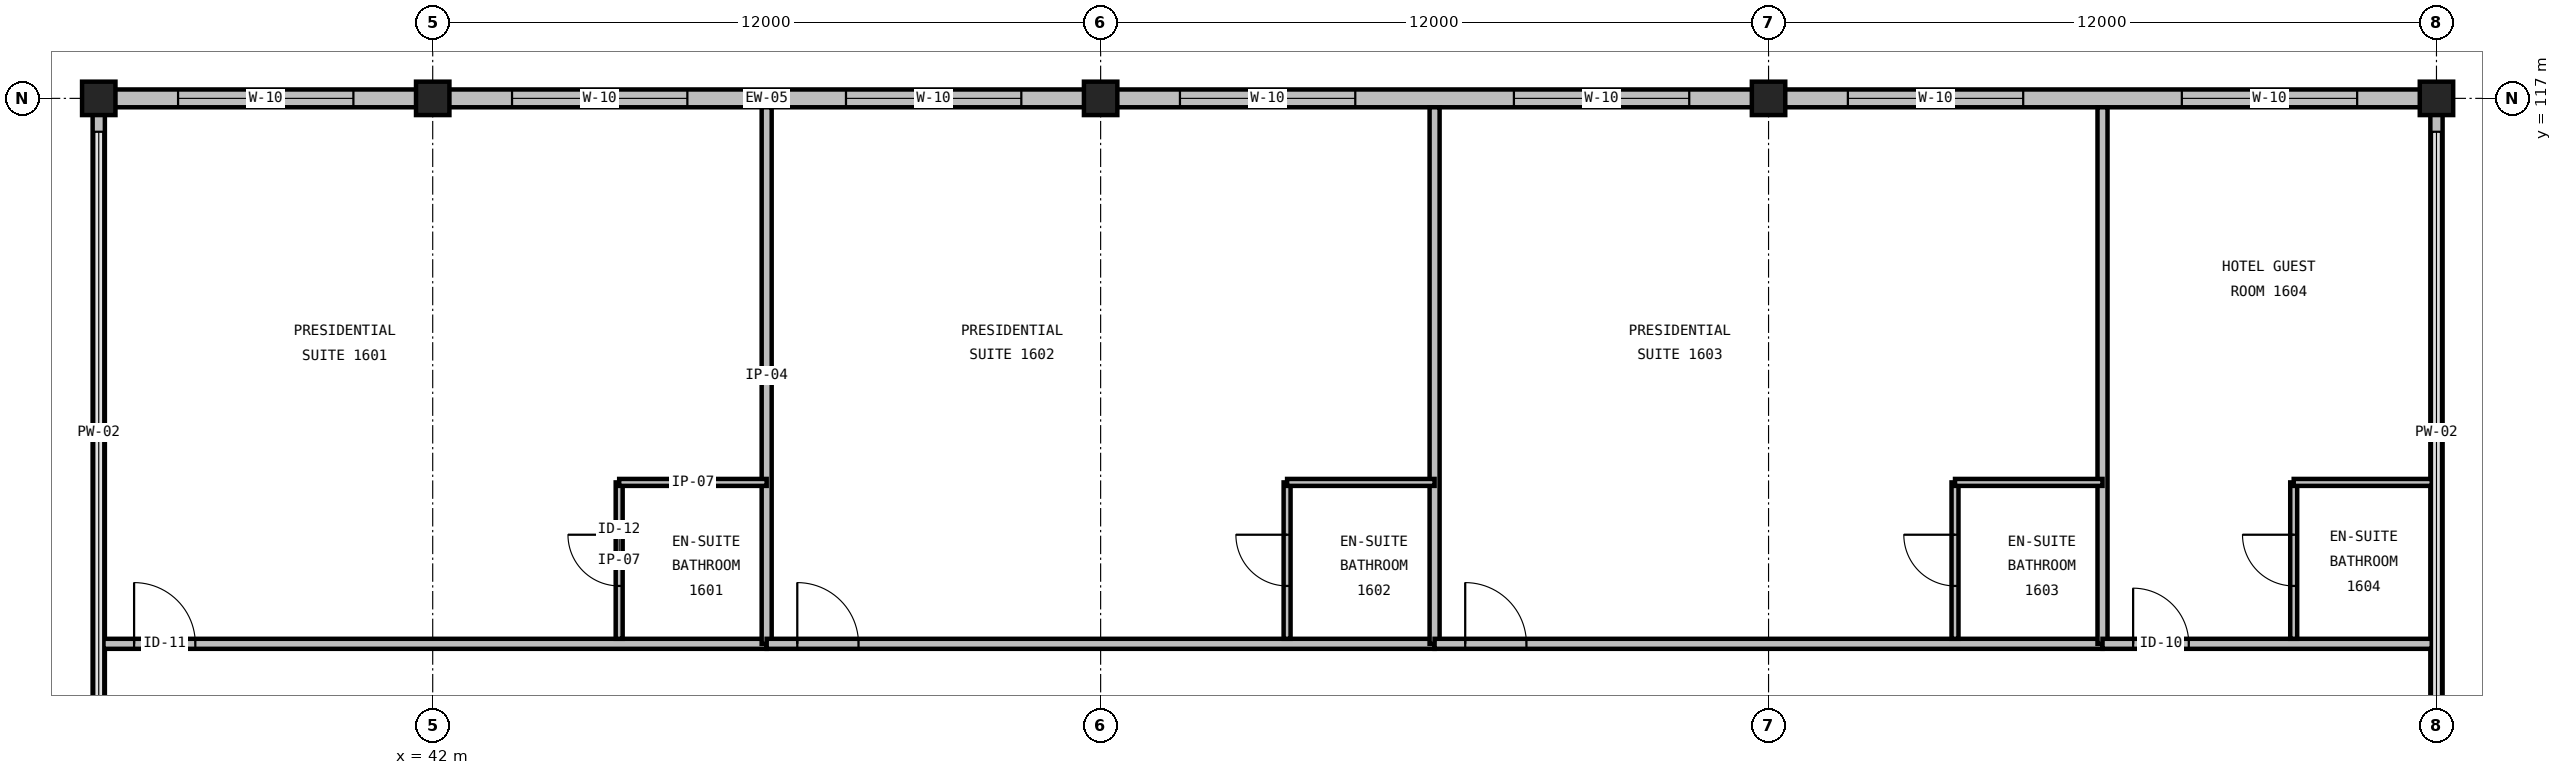
"""IFC4 building model, lengths in metres.
Left out: names, types, materials, properties, quantities, classifications, styles, units other than length and angle.
Written with IfcOpenShell. Run it as: python <this file> out.ifc"""

import sys

from ifc_helpers import new_model, si_unit, direction, frame, frame_2d, origin, origin_2d, place, context, subcontext, project, spatial, rectangle, extrude, element, fill, save


model = new_model("IFC4")
c1 = context("Model", 3, precision=1e-05, world=origin(), true_north=direction((0.0, 1.0)))
c2 = subcontext(c1, "Body", "Model", "MODEL_VIEW")
j1 = project(units=[si_unit("LENGTHUNIT", "METRE"), si_unit("PLANEANGLEUNIT", "RADIAN")], contexts=[c1])
p1 = place(None, origin())
s1 = spatial("IfcSite", under=j1, at=p1, CompositionType="ELEMENT")
p2 = place(p1, origin())
s2 = spatial("IfcBuilding", under=s1, at=p2, CompositionType="ELEMENT")
p3 = place(p2, frame((0.0, 0.0, 67.2)))
s3 = spatial("IfcBuildingStorey", under=s2, at=p3, CompositionType="ELEMENT", Elevation=67.2)
for number, where, z_axis, x_axis in (
    (1, (36.0, 117.0, 0.0), (0.0, 0.0, 1.0), (1.0, 0.0, 0.0)),
    (2, (42.0, 117.0, 0.0), (0.0, 0.0, 1.0), (1.0, 0.0, 0.0)),
    (3, (54.0, 117.0, 0.0), (0.0, 0.0, 1.0), (1.0, 0.0, 0.0)),
    (4, (66.0, 117.0, 0.0), (0.0, 0.0, 1.0), (1.0, 0.0, 0.0)),
    (5, (78.0, 117.0, 0.0), (0.0, 0.0, 1.0), (1.0, 0.0, 0.0)),
):
    element("IfcColumn", number, at=place(p3, frame(where, z_axis=z_axis, x_axis=x_axis)), inside=s3, PredefinedType="COLUMN", context=c2, shape_type="SweptSolid", body=[
        extrude(rectangle(XDim=0.6, YDim=0.6, at=origin_2d()), origin(), (0.0, 0.0, 1.0), 3.6),
    ])
p4 = place(p3, frame((42.0, 117.0, 0.0), z_axis=(0.0, 0.0, 1.0), x_axis=(-1.0, 0.0, 0.0)))
e6 = element("IfcWall", 6, at=p4, inside=s3, PredefinedType="STANDARD", context=c2, shape_type="SweptSolid", body=[
    extrude(rectangle(XDim=6.0, YDim=0.32, at=frame_2d((3.0, 0.0))), origin(), (0.0, 0.0, 1.0), 2.526),
])
p5 = place(p4, frame((1.425, 0.0, 0.65)))
e7 = element("IfcOpeningElement", 7, at=p5, cuts=e6, PredefinedType="OPENING", context=c2, shape_type="SweptSolid", body=[
    extrude(rectangle(XDim=3.15, YDim=1.75, at=frame_2d((1.575, 0.875))), frame((0.0, 0.175, 0.0), z_axis=(0.0, -1.0, 0.0), x_axis=(1.0, 0.0, 0.0)), (0.0, 0.0, 1.0), 0.35),
])
p6 = place(p3, frame((54.0, 117.0, 0.0), z_axis=(0.0, 0.0, 1.0), x_axis=(-1.0, 0.0, 0.0)))
e8 = element("IfcWall", 8, at=p6, inside=s3, PredefinedType="STANDARD", context=c2, shape_type="SweptSolid", body=[
    extrude(rectangle(XDim=12.0, YDim=0.32, at=frame_2d((6.0, 0.0))), origin(), (0.0, 0.0, 1.0), 2.526),
])
p7 = place(p6, frame((1.425, 0.0, 0.65)))
e9 = element("IfcOpeningElement", 9, at=p7, cuts=e8, PredefinedType="OPENING", context=c2, shape_type="SweptSolid", body=[
    extrude(rectangle(XDim=3.15, YDim=1.75, at=frame_2d((1.575, 0.875))), frame((0.0, 0.175, 0.0), z_axis=(0.0, -1.0, 0.0), x_axis=(1.0, 0.0, 0.0)), (0.0, 0.0, 1.0), 0.35),
])
p8 = place(p6, frame((7.425, 0.0, 0.65)))
e10 = element("IfcOpeningElement", 10, at=p8, cuts=e8, PredefinedType="OPENING", context=c2, shape_type="SweptSolid", body=[
    extrude(rectangle(XDim=3.15, YDim=1.75, at=frame_2d((1.575, 0.875))), frame((0.0, 0.175, 0.0), z_axis=(0.0, -1.0, 0.0), x_axis=(1.0, 0.0, 0.0)), (0.0, 0.0, 1.0), 0.35),
])
p9 = place(p3, frame((66.0, 117.0, 0.0), z_axis=(0.0, 0.0, 1.0), x_axis=(-1.0, 0.0, 0.0)))
e11 = element("IfcWall", 11, at=p9, inside=s3, PredefinedType="STANDARD", context=c2, shape_type="SweptSolid", body=[
    extrude(rectangle(XDim=12.0, YDim=0.32, at=frame_2d((6.0, 0.0))), origin(), (0.0, 0.0, 1.0), 2.526),
])
p10 = place(p9, frame((1.425, 0.0, 0.65)))
e12 = element("IfcOpeningElement", 12, at=p10, cuts=e11, PredefinedType="OPENING", context=c2, shape_type="SweptSolid", body=[
    extrude(rectangle(XDim=3.15, YDim=1.75, at=frame_2d((1.575, 0.875))), frame((0.0, 0.175, 0.0), z_axis=(0.0, -1.0, 0.0), x_axis=(1.0, 0.0, 0.0)), (0.0, 0.0, 1.0), 0.35),
])
p11 = place(p9, frame((7.425, 0.0, 0.65)))
e13 = element("IfcOpeningElement", 13, at=p11, cuts=e11, PredefinedType="OPENING", context=c2, shape_type="SweptSolid", body=[
    extrude(rectangle(XDim=3.15, YDim=1.75, at=frame_2d((1.575, 0.875))), frame((0.0, 0.175, 0.0), z_axis=(0.0, -1.0, 0.0), x_axis=(1.0, 0.0, 0.0)), (0.0, 0.0, 1.0), 0.35),
])
p12 = place(p3, frame((78.0, 117.0, 0.0), z_axis=(0.0, 0.0, 1.0), x_axis=(-1.0, 0.0, 0.0)))
e14 = element("IfcWall", 14, at=p12, inside=s3, PredefinedType="STANDARD", context=c2, shape_type="SweptSolid", body=[
    extrude(rectangle(XDim=12.0, YDim=0.32, at=frame_2d((6.0, 0.0))), origin(), (0.0, 0.0, 1.0), 2.526),
])
p13 = place(p12, frame((1.425, 0.0, 0.65)))
e15 = element("IfcOpeningElement", 15, at=p13, cuts=e14, PredefinedType="OPENING", context=c2, shape_type="SweptSolid", body=[
    extrude(rectangle(XDim=3.15, YDim=1.75, at=frame_2d((1.575, 0.875))), frame((0.0, 0.175, 0.0), z_axis=(0.0, -1.0, 0.0), x_axis=(1.0, 0.0, 0.0)), (0.0, 0.0, 1.0), 0.35),
])
p14 = place(p12, frame((7.425, 0.0, 0.65)))
e16 = element("IfcOpeningElement", 16, at=p14, cuts=e14, PredefinedType="OPENING", context=c2, shape_type="SweptSolid", body=[
    extrude(rectangle(XDim=3.15, YDim=1.75, at=frame_2d((1.575, 0.875))), frame((0.0, 0.175, 0.0), z_axis=(0.0, -1.0, 0.0), x_axis=(1.0, 0.0, 0.0)), (0.0, 0.0, 1.0), 0.35),
])
for number, where, z_axis, x_axis in (
    (17, (36.0, 117.0, 0.0), (0.0, 0.0, 1.0), (0.0, -1.0, 0.0)),
    (18, (78.0, 105.0, 0.0), (0.0, 0.0, 1.0), (0.0, 1.0, 0.0)),
):
    element("IfcWall", number, at=place(p3, frame(where, z_axis=z_axis, x_axis=x_axis)), inside=s3, PredefinedType="PARAPET", context=c2, shape_type="SweptSolid", body=[
        extrude(rectangle(XDim=12.0, YDim=0.22, at=frame_2d((6.0, 0.0))), origin(), (0.0, 0.0, 1.0), 0.2),
    ])
p15 = place(p3, frame((36.085, 107.2, 0.0), z_axis=(0.0, 0.0, 1.0), x_axis=(1.0, 0.0, 0.0)))
e19 = element("IfcWall", 19, at=p15, inside=s3, PredefinedType="PARTITIONING", context=c2, shape_type="SweptSolid", body=[
    extrude(rectangle(XDim=11.915, YDim=0.18, at=frame_2d((5.957, 0.0))), origin(), (0.0, 0.0, 1.0), 3.28),
])
p16 = place(p15, frame((0.55, 0.0, 0.0)))
e20 = element("IfcOpeningElement", 20, at=p16, cuts=e19, PredefinedType="OPENING", context=c2, shape_type="SweptSolid", body=[
    extrude(rectangle(XDim=1.1, YDim=2.2, at=frame_2d((0.55, 1.1))), frame((0.0, 0.105, 0.0), z_axis=(0.0, -1.0, 0.0), x_axis=(1.0, 0.0, 0.0)), (0.0, 0.0, 1.0), 0.21),
])
p17 = place(p3, frame((48.0, 107.2, 0.0), z_axis=(0.0, 0.0, 1.0), x_axis=(0.0, 1.0, 0.0)))
e21 = element("IfcWall", 21, at=p17, inside=s3, PredefinedType="PARTITIONING", context=c2, shape_type="SweptSolid", body=[
    extrude(rectangle(XDim=9.64, YDim=0.18, at=frame_2d((4.82, 0.0))), origin(), (0.0, 0.0, 1.0), 3.28),
])
p18 = place(p3, frame((45.35, 107.29, 0.0), z_axis=(0.0, 0.0, 1.0), x_axis=(0.0, 1.0, 0.0)))
e22 = element("IfcWall", 22, at=p18, inside=s3, PredefinedType="PARTITIONING", context=c2, shape_type="SweptSolid", body=[
    extrude(rectangle(XDim=2.81, YDim=0.125, at=frame_2d((1.405, 0.0))), origin(), (0.0, 0.0, 1.0), 3.28),
])
p19 = place(p18, frame((0.95, 0.0, 0.0)))
e23 = element("IfcOpeningElement", 23, at=p19, cuts=e22, PredefinedType="OPENING", context=c2, shape_type="SweptSolid", body=[
    extrude(rectangle(XDim=0.92, YDim=2.1, at=frame_2d((0.46, 1.05))), frame((0.0, 0.077, 0.0), z_axis=(0.0, -1.0, 0.0), x_axis=(1.0, 0.0, 0.0)), (0.0, 0.0, 1.0), 0.155),
])
p20 = place(p3, frame((45.35, 110.1, 0.0), z_axis=(0.0, 0.0, 1.0), x_axis=(1.0, 0.0, 0.0)))
e24 = element("IfcWall", 24, at=p20, inside=s3, PredefinedType="PARTITIONING", context=c2, shape_type="SweptSolid", body=[
    extrude(rectangle(XDim=2.65, YDim=0.125, at=frame_2d((1.325, 0.0))), origin(), (0.0, 0.0, 1.0), 3.28),
])
p21 = place(p3, frame((48.0, 107.2, 0.0), z_axis=(0.0, 0.0, 1.0), x_axis=(1.0, 0.0, 0.0)))
e25 = element("IfcWall", 25, at=p21, inside=s3, PredefinedType="PARTITIONING", context=c2, shape_type="SweptSolid", body=[
    extrude(rectangle(XDim=12.0, YDim=0.18, at=frame_2d((6.0, 0.0))), origin(), (0.0, 0.0, 1.0), 3.28),
])
p22 = place(p21, frame((0.55, 0.0, 0.0)))
e26 = element("IfcOpeningElement", 26, at=p22, cuts=e25, PredefinedType="OPENING", context=c2, shape_type="SweptSolid", body=[
    extrude(rectangle(XDim=1.1, YDim=2.2, at=frame_2d((0.55, 1.1))), frame((0.0, 0.105, 0.0), z_axis=(0.0, -1.0, 0.0), x_axis=(1.0, 0.0, 0.0)), (0.0, 0.0, 1.0), 0.21),
])
p23 = place(p3, frame((60.0, 107.2, 0.0), z_axis=(0.0, 0.0, 1.0), x_axis=(0.0, 1.0, 0.0)))
e27 = element("IfcWall", 27, at=p23, inside=s3, PredefinedType="PARTITIONING", context=c2, shape_type="SweptSolid", body=[
    extrude(rectangle(XDim=9.64, YDim=0.18, at=frame_2d((4.82, 0.0))), origin(), (0.0, 0.0, 1.0), 3.28),
])
p24 = place(p3, frame((57.35, 107.29, 0.0), z_axis=(0.0, 0.0, 1.0), x_axis=(0.0, 1.0, 0.0)))
e28 = element("IfcWall", 28, at=p24, inside=s3, PredefinedType="PARTITIONING", context=c2, shape_type="SweptSolid", body=[
    extrude(rectangle(XDim=2.81, YDim=0.125, at=frame_2d((1.405, 0.0))), origin(), (0.0, 0.0, 1.0), 3.28),
])
p25 = place(p24, frame((0.95, 0.0, 0.0)))
e29 = element("IfcOpeningElement", 29, at=p25, cuts=e28, PredefinedType="OPENING", context=c2, shape_type="SweptSolid", body=[
    extrude(rectangle(XDim=0.92, YDim=2.1, at=frame_2d((0.46, 1.05))), frame((0.0, 0.077, 0.0), z_axis=(0.0, -1.0, 0.0), x_axis=(1.0, 0.0, 0.0)), (0.0, 0.0, 1.0), 0.155),
])
p26 = place(p3, frame((57.35, 110.1, 0.0), z_axis=(0.0, 0.0, 1.0), x_axis=(1.0, 0.0, 0.0)))
e30 = element("IfcWall", 30, at=p26, inside=s3, PredefinedType="PARTITIONING", context=c2, shape_type="SweptSolid", body=[
    extrude(rectangle(XDim=2.65, YDim=0.125, at=frame_2d((1.325, 0.0))), origin(), (0.0, 0.0, 1.0), 3.28),
])
p27 = place(p3, frame((60.0, 107.2, 0.0), z_axis=(0.0, 0.0, 1.0), x_axis=(1.0, 0.0, 0.0)))
e31 = element("IfcWall", 31, at=p27, inside=s3, PredefinedType="PARTITIONING", context=c2, shape_type="SweptSolid", body=[
    extrude(rectangle(XDim=12.0, YDim=0.18, at=frame_2d((6.0, 0.0))), origin(), (0.0, 0.0, 1.0), 3.28),
])
p28 = place(p27, frame((0.55, 0.0, 0.0)))
e32 = element("IfcOpeningElement", 32, at=p28, cuts=e31, PredefinedType="OPENING", context=c2, shape_type="SweptSolid", body=[
    extrude(rectangle(XDim=1.1, YDim=2.2, at=frame_2d((0.55, 1.1))), frame((0.0, 0.105, 0.0), z_axis=(0.0, -1.0, 0.0), x_axis=(1.0, 0.0, 0.0)), (0.0, 0.0, 1.0), 0.21),
])
p29 = place(p3, frame((72.0, 107.2, 0.0), z_axis=(0.0, 0.0, 1.0), x_axis=(0.0, 1.0, 0.0)))
e33 = element("IfcWall", 33, at=p29, inside=s3, PredefinedType="PARTITIONING", context=c2, shape_type="SweptSolid", body=[
    extrude(rectangle(XDim=9.64, YDim=0.18, at=frame_2d((4.82, 0.0))), origin(), (0.0, 0.0, 1.0), 3.28),
])
p30 = place(p3, frame((69.35, 107.29, 0.0), z_axis=(0.0, 0.0, 1.0), x_axis=(0.0, 1.0, 0.0)))
e34 = element("IfcWall", 34, at=p30, inside=s3, PredefinedType="PARTITIONING", context=c2, shape_type="SweptSolid", body=[
    extrude(rectangle(XDim=2.81, YDim=0.125, at=frame_2d((1.405, 0.0))), origin(), (0.0, 0.0, 1.0), 3.28),
])
p31 = place(p30, frame((0.95, 0.0, 0.0)))
e35 = element("IfcOpeningElement", 35, at=p31, cuts=e34, PredefinedType="OPENING", context=c2, shape_type="SweptSolid", body=[
    extrude(rectangle(XDim=0.92, YDim=2.1, at=frame_2d((0.46, 1.05))), frame((0.0, 0.077, 0.0), z_axis=(0.0, -1.0, 0.0), x_axis=(1.0, 0.0, 0.0)), (0.0, 0.0, 1.0), 0.155),
])
p32 = place(p3, frame((69.35, 110.1, 0.0), z_axis=(0.0, 0.0, 1.0), x_axis=(1.0, 0.0, 0.0)))
e36 = element("IfcWall", 36, at=p32, inside=s3, PredefinedType="PARTITIONING", context=c2, shape_type="SweptSolid", body=[
    extrude(rectangle(XDim=2.65, YDim=0.125, at=frame_2d((1.325, 0.0))), origin(), (0.0, 0.0, 1.0), 3.28),
])
p33 = place(p3, frame((72.0, 107.2, 0.0), z_axis=(0.0, 0.0, 1.0), x_axis=(1.0, 0.0, 0.0)))
e37 = element("IfcWall", 37, at=p33, inside=s3, PredefinedType="PARTITIONING", context=c2, shape_type="SweptSolid", body=[
    extrude(rectangle(XDim=5.915, YDim=0.18, at=frame_2d((2.957, 0.0))), origin(), (0.0, 0.0, 1.0), 3.28),
])
p34 = place(p33, frame((0.55, 0.0, 0.0)))
e38 = element("IfcOpeningElement", 38, at=p34, cuts=e37, PredefinedType="OPENING", context=c2, shape_type="SweptSolid", body=[
    extrude(rectangle(XDim=1.0, YDim=2.15, at=frame_2d((0.5, 1.075))), frame((0.0, 0.105, 0.0), z_axis=(0.0, -1.0, 0.0), x_axis=(1.0, 0.0, 0.0)), (0.0, 0.0, 1.0), 0.21),
])
p35 = place(p3, frame((75.435, 107.29, 0.0), z_axis=(0.0, 0.0, 1.0), x_axis=(0.0, 1.0, 0.0)))
e39 = element("IfcWall", 39, at=p35, inside=s3, PredefinedType="PARTITIONING", context=c2, shape_type="SweptSolid", body=[
    extrude(rectangle(XDim=2.81, YDim=0.125, at=frame_2d((1.405, 0.0))), origin(), (0.0, 0.0, 1.0), 3.28),
])
p36 = place(p35, frame((0.95, 0.0, 0.0)))
e40 = element("IfcOpeningElement", 40, at=p36, cuts=e39, PredefinedType="OPENING", context=c2, shape_type="SweptSolid", body=[
    extrude(rectangle(XDim=0.92, YDim=2.1, at=frame_2d((0.46, 1.05))), frame((0.0, 0.077, 0.0), z_axis=(0.0, -1.0, 0.0), x_axis=(1.0, 0.0, 0.0)), (0.0, 0.0, 1.0), 0.155),
])
p37 = place(p3, frame((75.435, 110.1, 0.0), z_axis=(0.0, 0.0, 1.0), x_axis=(1.0, 0.0, 0.0)))
e41 = element("IfcWall", 41, at=p37, inside=s3, PredefinedType="PARTITIONING", context=c2, shape_type="SweptSolid", body=[
    extrude(rectangle(XDim=2.48, YDim=0.125, at=frame_2d((1.24, 0.0))), origin(), (0.0, 0.0, 1.0), 3.28),
])
p38 = place(p5, origin())
e42 = element("IfcWindow", 42, at=p38, inside=s3, PartitioningType="TRIPLE_PANEL_VERTICAL", PredefinedType="WINDOW", context=c2, shape_type="SweptSolid", body=[
    extrude(rectangle(XDim=3.15, YDim=1.75, at=frame_2d((1.575, 0.875))), frame((0.0, 0.03, 0.0), z_axis=(0.0, -1.0, 0.0), x_axis=(1.0, 0.0, 0.0)), (0.0, 0.0, 1.0), 0.06),
])
fill(e7, e42)
p39 = place(p7, origin())
e43 = element("IfcWindow", 43, at=p39, inside=s3, PartitioningType="TRIPLE_PANEL_VERTICAL", PredefinedType="WINDOW", context=c2, shape_type="SweptSolid", body=[
    extrude(rectangle(XDim=3.15, YDim=1.75, at=frame_2d((1.575, 0.875))), frame((0.0, 0.03, 0.0), z_axis=(0.0, -1.0, 0.0), x_axis=(1.0, 0.0, 0.0)), (0.0, 0.0, 1.0), 0.06),
])
fill(e9, e43)
p40 = place(p8, origin())
e44 = element("IfcWindow", 44, at=p40, inside=s3, PartitioningType="TRIPLE_PANEL_VERTICAL", PredefinedType="WINDOW", context=c2, shape_type="SweptSolid", body=[
    extrude(rectangle(XDim=3.15, YDim=1.75, at=frame_2d((1.575, 0.875))), frame((0.0, 0.03, 0.0), z_axis=(0.0, -1.0, 0.0), x_axis=(1.0, 0.0, 0.0)), (0.0, 0.0, 1.0), 0.06),
])
fill(e10, e44)
p41 = place(p10, origin())
e45 = element("IfcWindow", 45, at=p41, inside=s3, PartitioningType="TRIPLE_PANEL_VERTICAL", PredefinedType="WINDOW", context=c2, shape_type="SweptSolid", body=[
    extrude(rectangle(XDim=3.15, YDim=1.75, at=frame_2d((1.575, 0.875))), frame((0.0, 0.03, 0.0), z_axis=(0.0, -1.0, 0.0), x_axis=(1.0, 0.0, 0.0)), (0.0, 0.0, 1.0), 0.06),
])
fill(e12, e45)
p42 = place(p11, origin())
e46 = element("IfcWindow", 46, at=p42, inside=s3, PartitioningType="TRIPLE_PANEL_VERTICAL", PredefinedType="WINDOW", context=c2, shape_type="SweptSolid", body=[
    extrude(rectangle(XDim=3.15, YDim=1.75, at=frame_2d((1.575, 0.875))), frame((0.0, 0.03, 0.0), z_axis=(0.0, -1.0, 0.0), x_axis=(1.0, 0.0, 0.0)), (0.0, 0.0, 1.0), 0.06),
])
fill(e13, e46)
p43 = place(p13, origin())
e47 = element("IfcWindow", 47, at=p43, inside=s3, PartitioningType="TRIPLE_PANEL_VERTICAL", PredefinedType="WINDOW", context=c2, shape_type="SweptSolid", body=[
    extrude(rectangle(XDim=3.15, YDim=1.75, at=frame_2d((1.575, 0.875))), frame((0.0, 0.03, 0.0), z_axis=(0.0, -1.0, 0.0), x_axis=(1.0, 0.0, 0.0)), (0.0, 0.0, 1.0), 0.06),
])
fill(e15, e47)
p44 = place(p14, origin())
e48 = element("IfcWindow", 48, at=p44, inside=s3, PartitioningType="TRIPLE_PANEL_VERTICAL", PredefinedType="WINDOW", context=c2, shape_type="SweptSolid", body=[
    extrude(rectangle(XDim=3.15, YDim=1.75, at=frame_2d((1.575, 0.875))), frame((0.0, 0.03, 0.0), z_axis=(0.0, -1.0, 0.0), x_axis=(1.0, 0.0, 0.0)), (0.0, 0.0, 1.0), 0.06),
])
fill(e16, e48)
p45 = place(p16, origin())
e49 = element("IfcDoor", 49, at=p45, inside=s3, OperationType="SINGLE_SWING_LEFT", PredefinedType="DOOR", context=c2, shape_type="SweptSolid", body=[
    extrude(rectangle(XDim=1.1, YDim=2.2, at=frame_2d((0.55, 1.1))), frame((0.0, 0.025, 0.0), z_axis=(0.0, -1.0, 0.0), x_axis=(1.0, 0.0, 0.0)), (0.0, 0.0, 1.0), 0.05),
])
fill(e20, e49)
p46 = place(p19, origin())
e50 = element("IfcDoor", 50, at=p46, inside=s3, OperationType="SINGLE_SWING_RIGHT", PredefinedType="DOOR", context=c2, shape_type="SweptSolid", body=[
    extrude(rectangle(XDim=0.92, YDim=2.1, at=frame_2d((0.46, 1.05))), frame((0.0, 0.025, 0.0), z_axis=(0.0, -1.0, 0.0), x_axis=(1.0, 0.0, 0.0)), (0.0, 0.0, 1.0), 0.05),
])
fill(e23, e50)
p47 = place(p22, origin())
e51 = element("IfcDoor", 51, at=p47, inside=s3, OperationType="SINGLE_SWING_LEFT", PredefinedType="DOOR", context=c2, shape_type="SweptSolid", body=[
    extrude(rectangle(XDim=1.1, YDim=2.2, at=frame_2d((0.55, 1.1))), frame((0.0, 0.025, 0.0), z_axis=(0.0, -1.0, 0.0), x_axis=(1.0, 0.0, 0.0)), (0.0, 0.0, 1.0), 0.05),
])
fill(e26, e51)
p48 = place(p25, origin())
e52 = element("IfcDoor", 52, at=p48, inside=s3, OperationType="SINGLE_SWING_RIGHT", PredefinedType="DOOR", context=c2, shape_type="SweptSolid", body=[
    extrude(rectangle(XDim=0.92, YDim=2.1, at=frame_2d((0.46, 1.05))), frame((0.0, 0.025, 0.0), z_axis=(0.0, -1.0, 0.0), x_axis=(1.0, 0.0, 0.0)), (0.0, 0.0, 1.0), 0.05),
])
fill(e29, e52)
p49 = place(p28, origin())
e53 = element("IfcDoor", 53, at=p49, inside=s3, OperationType="SINGLE_SWING_LEFT", PredefinedType="DOOR", context=c2, shape_type="SweptSolid", body=[
    extrude(rectangle(XDim=1.1, YDim=2.2, at=frame_2d((0.55, 1.1))), frame((0.0, 0.025, 0.0), z_axis=(0.0, -1.0, 0.0), x_axis=(1.0, 0.0, 0.0)), (0.0, 0.0, 1.0), 0.05),
])
fill(e32, e53)
p50 = place(p31, origin())
e54 = element("IfcDoor", 54, at=p50, inside=s3, OperationType="SINGLE_SWING_RIGHT", PredefinedType="DOOR", context=c2, shape_type="SweptSolid", body=[
    extrude(rectangle(XDim=0.92, YDim=2.1, at=frame_2d((0.46, 1.05))), frame((0.0, 0.025, 0.0), z_axis=(0.0, -1.0, 0.0), x_axis=(1.0, 0.0, 0.0)), (0.0, 0.0, 1.0), 0.05),
])
fill(e35, e54)
p51 = place(p34, origin())
e55 = element("IfcDoor", 55, at=p51, inside=s3, OperationType="SINGLE_SWING_LEFT", PredefinedType="DOOR", context=c2, shape_type="SweptSolid", body=[
    extrude(rectangle(XDim=1.0, YDim=2.15, at=frame_2d((0.5, 1.075))), frame((0.0, 0.025, 0.0), z_axis=(0.0, -1.0, 0.0), x_axis=(1.0, 0.0, 0.0)), (0.0, 0.0, 1.0), 0.05),
])
fill(e38, e55)
p52 = place(p36, origin())
e56 = element("IfcDoor", 56, at=p52, inside=s3, OperationType="SINGLE_SWING_RIGHT", PredefinedType="DOOR", context=c2, shape_type="SweptSolid", body=[
    extrude(rectangle(XDim=0.92, YDim=2.1, at=frame_2d((0.46, 1.05))), frame((0.0, 0.025, 0.0), z_axis=(0.0, -1.0, 0.0), x_axis=(1.0, 0.0, 0.0)), (0.0, 0.0, 1.0), 0.05),
])
fill(e40, e56)
save(model, sys.argv[1])
